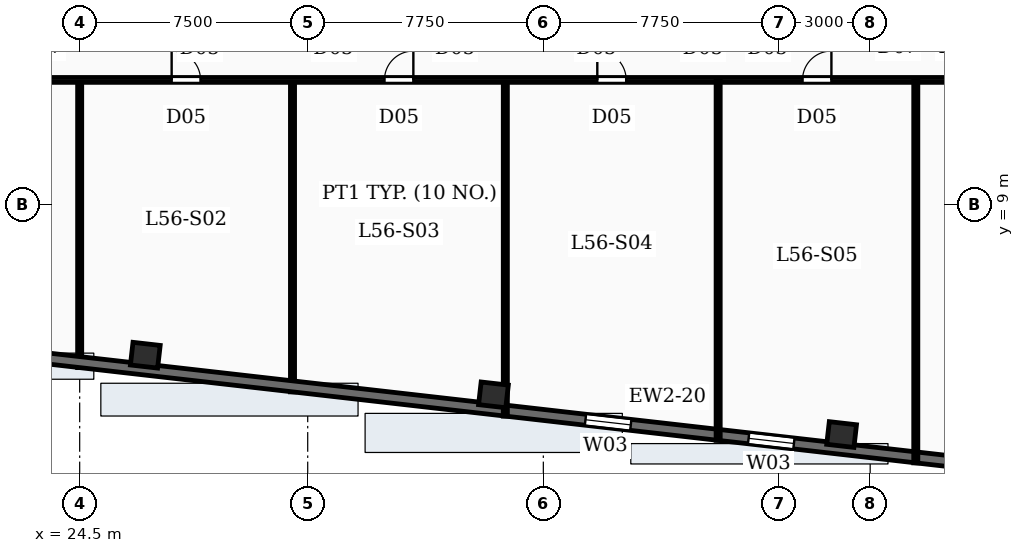
"""IFC4 building model, lengths in metres.
Left out: names, types, materials, properties, quantities, classifications, styles, units other than length and angle.
Written with IfcOpenShell. Run it as: python <this file> out.ifc"""

import sys

from ifc_helpers import new_model, si_unit, direction, frame, frame_2d, origin, origin_2d, place, context, subcontext, project, spatial, rectangle, extrude, element, fill, save


model = new_model("IFC4")
c1 = context("Model", 3, precision=1e-05, world=origin(), true_north=direction((0.0, 1.0)))
c2 = subcontext(c1, "Body", "Model", "MODEL_VIEW")
j1 = project(units=[si_unit("LENGTHUNIT", "METRE"), si_unit("PLANEANGLEUNIT", "RADIAN")], contexts=[c1])
p1 = place(None, origin())
s1 = spatial("IfcSite", under=j1, at=p1, CompositionType="ELEMENT")
p2 = place(p1, origin())
s2 = spatial("IfcBuilding", under=s1, at=p2, CompositionType="ELEMENT")
p3 = place(p2, frame((0.0, 0.0, 232.2)))
s3 = spatial("IfcBuildingStorey", under=s2, at=p3, CompositionType="ELEMENT", Elevation=232.2)
for number, where, z_axis, x_axis in (
    (1, (26.659, 4.046, -0.27), (0.0, 0.0, 1.0), (0.994, -0.113, 0.0)),
    (2, (38.11, 2.741, -0.27), (0.0, 0.0, 1.0), (0.994, -0.113, 0.0)),
    (3, (49.56, 1.437, -0.27), (0.0, 0.0, 1.0), (0.994, -0.113, 0.0)),
):
    element("IfcColumn", number, at=place(p3, frame(where, z_axis=z_axis, x_axis=x_axis)), inside=s3, PredefinedType="COLUMN", context=c2, shape_type="SweptSolid", body=[
        extrude(rectangle(XDim=0.9, YDim=0.75, at=origin_2d()), origin(), (0.0, 0.0, 1.0), 3.75),
    ])
p4 = place(p3, frame((61.306, -0.375, 0.0), z_axis=(0.0, 0.0, 1.0), x_axis=(-0.993571958919, 0.113202307616, 0.0)))
e4 = element("IfcWall", 4, at=p4, inside=s3, PredefinedType="SOLIDWALL", context=c2, shape_type="SweptSolid", body=[
    extrude(rectangle(XDim=46.8, YDim=0.36, at=frame_2d((23.4, 0.0))), origin(), (0.0, 0.0, 1.0), 3.48),
])
p5 = place(p4, frame((2.6, 0.0, 0.88)))
e5 = element("IfcOpeningElement", 5, at=p5, cuts=e4, PredefinedType="OPENING", context=c2, shape_type="SweptSolid", body=[
    extrude(rectangle(XDim=1.5, YDim=2.05, at=frame_2d((0.75, 1.025))), frame((0.0, 0.19, 0.0), z_axis=(0.0, -1.0, 0.0), x_axis=(1.0, 0.0, 0.0)), (0.0, 0.0, 1.0), 0.38),
])
p6 = place(p4, frame((13.4, 0.0, 0.88)))
e6 = element("IfcOpeningElement", 6, at=p6, cuts=e4, PredefinedType="OPENING", context=c2, shape_type="SweptSolid", body=[
    extrude(rectangle(XDim=1.5, YDim=2.05, at=frame_2d((0.75, 1.025))), frame((0.0, 0.19, 0.0), z_axis=(0.0, -1.0, 0.0), x_axis=(1.0, 0.0, 0.0)), (0.0, 0.0, 1.0), 0.38),
])
p7 = place(p4, frame((18.8, 0.0, 0.88)))
e7 = element("IfcOpeningElement", 7, at=p7, cuts=e4, PredefinedType="OPENING", context=c2, shape_type="SweptSolid", body=[
    extrude(rectangle(XDim=1.5, YDim=2.05, at=frame_2d((0.75, 1.025))), frame((0.0, 0.19, 0.0), z_axis=(0.0, -1.0, 0.0), x_axis=(1.0, 0.0, 0.0)), (0.0, 0.0, 1.0), 0.38),
])
p8 = place(p4, frame((40.4, 0.0, 0.88)))
e8 = element("IfcOpeningElement", 8, at=p8, cuts=e4, PredefinedType="OPENING", context=c2, shape_type="SweptSolid", body=[
    extrude(rectangle(XDim=1.5, YDim=2.05, at=frame_2d((0.75, 1.025))), frame((0.0, 0.19, 0.0), z_axis=(0.0, -1.0, 0.0), x_axis=(1.0, 0.0, 0.0)), (0.0, 0.0, 1.0), 0.38),
])
p9 = place(p3, frame((24.5, 3.638, 0.0), z_axis=(0.0, 0.0, 1.0), x_axis=(0.0, 1.0, 0.0)))
e9 = element("IfcWall", 9, at=p9, inside=s3, PredefinedType="PARTITIONING", context=c2, shape_type="SweptSolid", body=[
    extrude(rectangle(XDim=9.462, YDim=0.135, at=frame_2d((4.731, 0.0))), origin(), (0.0, 0.0, 1.0), 2.54),
])
p10 = place(p3, frame((31.5, 2.84, 0.0), z_axis=(0.0, 0.0, 1.0), x_axis=(0.0, 1.0, 0.0)))
e10 = element("IfcWall", 10, at=p10, inside=s3, PredefinedType="PARTITIONING", context=c2, shape_type="SweptSolid", body=[
    extrude(rectangle(XDim=10.26, YDim=0.135, at=frame_2d((5.13, 0.0))), origin(), (0.0, 0.0, 1.0), 2.54),
])
p11 = place(p3, frame((38.5, 2.043, 0.0), z_axis=(0.0, 0.0, 1.0), x_axis=(0.0, 1.0, 0.0)))
e11 = element("IfcWall", 11, at=p11, inside=s3, PredefinedType="PARTITIONING", context=c2, shape_type="SweptSolid", body=[
    extrude(rectangle(XDim=11.057, YDim=0.135, at=frame_2d((5.529, 0.0))), origin(), (0.0, 0.0, 1.0), 2.54),
])
p12 = place(p3, frame((45.5, 1.245, 0.0), z_axis=(0.0, 0.0, 1.0), x_axis=(0.0, 1.0, 0.0)))
e12 = element("IfcWall", 12, at=p12, inside=s3, PredefinedType="PARTITIONING", context=c2, shape_type="SweptSolid", body=[
    extrude(rectangle(XDim=11.855, YDim=0.135, at=frame_2d((5.927, 0.0))), origin(), (0.0, 0.0, 1.0), 2.54),
])
p13 = place(p3, frame((52.0, 0.505, 0.0), z_axis=(0.0, 0.0, 1.0), x_axis=(0.0, 1.0, 0.0)))
e13 = element("IfcWall", 13, at=p13, inside=s3, PredefinedType="PARTITIONING", context=c2, shape_type="SweptSolid", body=[
    extrude(rectangle(XDim=12.595, YDim=0.135, at=frame_2d((6.298, 0.0))), origin(), (0.0, 0.0, 1.0), 2.54),
])
p14 = place(p3, frame((10.303, 13.1, 0.0), z_axis=(0.0, 0.0, 1.0), x_axis=(1.0, 0.0, 0.0)))
e14 = element("IfcWall", 14, at=p14, inside=s3, PredefinedType="PARTITIONING", context=c2, shape_type="SweptSolid", body=[
    extrude(rectangle(XDim=57.973, YDim=0.16, at=frame_2d((28.986, 0.0))), origin(), (0.0, 0.0, 1.0), 2.54),
])
p15 = place(p14, frame((8.922, 0.0, 0.0)))
e15 = element("IfcOpeningElement", 15, at=p15, cuts=e14, PredefinedType="OPENING", context=c2, shape_type="SweptSolid", body=[
    extrude(rectangle(XDim=0.95, YDim=2.15, at=frame_2d((0.475, 1.075))), frame((0.0, 0.09, 0.0), z_axis=(0.0, -1.0, 0.0), x_axis=(1.0, 0.0, 0.0)), (0.0, 0.0, 1.0), 0.18),
])
p16 = place(p14, frame((17.222, 0.0, 0.0)))
e16 = element("IfcOpeningElement", 16, at=p16, cuts=e14, PredefinedType="OPENING", context=c2, shape_type="SweptSolid", body=[
    extrude(rectangle(XDim=0.95, YDim=2.15, at=frame_2d((0.475, 1.075))), frame((0.0, 0.09, 0.0), z_axis=(0.0, -1.0, 0.0), x_axis=(1.0, 0.0, 0.0)), (0.0, 0.0, 1.0), 0.18),
])
p17 = place(p14, frame((24.222, 0.0, 0.0)))
e17 = element("IfcOpeningElement", 17, at=p17, cuts=e14, PredefinedType="OPENING", context=c2, shape_type="SweptSolid", body=[
    extrude(rectangle(XDim=0.95, YDim=2.15, at=frame_2d((0.475, 1.075))), frame((0.0, 0.09, 0.0), z_axis=(0.0, -1.0, 0.0), x_axis=(1.0, 0.0, 0.0)), (0.0, 0.0, 1.0), 0.18),
])
p18 = place(p14, frame((31.222, 0.0, 0.0)))
e18 = element("IfcOpeningElement", 18, at=p18, cuts=e14, PredefinedType="OPENING", context=c2, shape_type="SweptSolid", body=[
    extrude(rectangle(XDim=0.95, YDim=2.15, at=frame_2d((0.475, 1.075))), frame((0.0, 0.09, 0.0), z_axis=(0.0, -1.0, 0.0), x_axis=(1.0, 0.0, 0.0)), (0.0, 0.0, 1.0), 0.18),
])
p19 = place(p14, frame((37.972, 0.0, 0.0)))
e19 = element("IfcOpeningElement", 19, at=p19, cuts=e14, PredefinedType="OPENING", context=c2, shape_type="SweptSolid", body=[
    extrude(rectangle(XDim=0.95, YDim=2.15, at=frame_2d((0.475, 1.075))), frame((0.0, 0.09, 0.0), z_axis=(0.0, -1.0, 0.0), x_axis=(1.0, 0.0, 0.0)), (0.0, 0.0, 1.0), 0.18),
])
p20 = place(p14, frame((45.222, 0.0, 0.0)))
e20 = element("IfcOpeningElement", 20, at=p20, cuts=e14, PredefinedType="OPENING", context=c2, shape_type="SweptSolid", body=[
    extrude(rectangle(XDim=0.95, YDim=2.15, at=frame_2d((0.475, 1.075))), frame((0.0, 0.09, 0.0), z_axis=(0.0, -1.0, 0.0), x_axis=(1.0, 0.0, 0.0)), (0.0, 0.0, 1.0), 0.18),
])
p21 = place(p6, origin())
e21 = element("IfcWindow", 21, at=p21, inside=s3, PartitioningType="SINGLE_PANEL", PredefinedType="WINDOW", context=c2, shape_type="SweptSolid", body=[
    extrude(rectangle(XDim=1.5, YDim=2.05, at=frame_2d((0.75, 1.025))), frame((0.0, 0.03, 0.0), z_axis=(0.0, -1.0, 0.0), x_axis=(1.0, 0.0, 0.0)), (0.0, 0.0, 1.0), 0.06),
])
fill(e6, e21)
p22 = place(p7, origin())
e22 = element("IfcWindow", 22, at=p22, inside=s3, PartitioningType="SINGLE_PANEL", PredefinedType="WINDOW", context=c2, shape_type="SweptSolid", body=[
    extrude(rectangle(XDim=1.5, YDim=2.05, at=frame_2d((0.75, 1.025))), frame((0.0, 0.03, 0.0), z_axis=(0.0, -1.0, 0.0), x_axis=(1.0, 0.0, 0.0)), (0.0, 0.0, 1.0), 0.06),
])
fill(e7, e22)
p23 = place(p16, origin())
e23 = element("IfcDoor", 23, at=p23, inside=s3, OperationType="SINGLE_SWING_LEFT", PredefinedType="DOOR", context=c2, shape_type="SweptSolid", body=[
    extrude(rectangle(XDim=0.95, YDim=2.15, at=frame_2d((0.475, 1.075))), frame((0.0, 0.025, 0.0), z_axis=(0.0, -1.0, 0.0), x_axis=(1.0, 0.0, 0.0)), (0.0, 0.0, 1.0), 0.05),
])
fill(e16, e23)
p24 = place(p17, origin())
e24 = element("IfcDoor", 24, at=p24, inside=s3, OperationType="SINGLE_SWING_RIGHT", PredefinedType="DOOR", context=c2, shape_type="SweptSolid", body=[
    extrude(rectangle(XDim=0.95, YDim=2.15, at=frame_2d((0.475, 1.075))), frame((0.0, 0.025, 0.0), z_axis=(0.0, -1.0, 0.0), x_axis=(1.0, 0.0, 0.0)), (0.0, 0.0, 1.0), 0.05),
])
fill(e17, e24)
p25 = place(p18, origin())
e25 = element("IfcDoor", 25, at=p25, inside=s3, OperationType="SINGLE_SWING_LEFT", PredefinedType="DOOR", context=c2, shape_type="SweptSolid", body=[
    extrude(rectangle(XDim=0.95, YDim=2.15, at=frame_2d((0.475, 1.075))), frame((0.0, 0.025, 0.0), z_axis=(0.0, -1.0, 0.0), x_axis=(1.0, 0.0, 0.0)), (0.0, 0.0, 1.0), 0.05),
])
fill(e18, e25)
p26 = place(p19, origin())
e26 = element("IfcDoor", 26, at=p26, inside=s3, OperationType="SINGLE_SWING_RIGHT", PredefinedType="DOOR", context=c2, shape_type="SweptSolid", body=[
    extrude(rectangle(XDim=0.95, YDim=2.15, at=frame_2d((0.475, 1.075))), frame((0.0, 0.025, 0.0), z_axis=(0.0, -1.0, 0.0), x_axis=(1.0, 0.0, 0.0)), (0.0, 0.0, 1.0), 0.05),
])
fill(e19, e26)
save(model, sys.argv[1])
